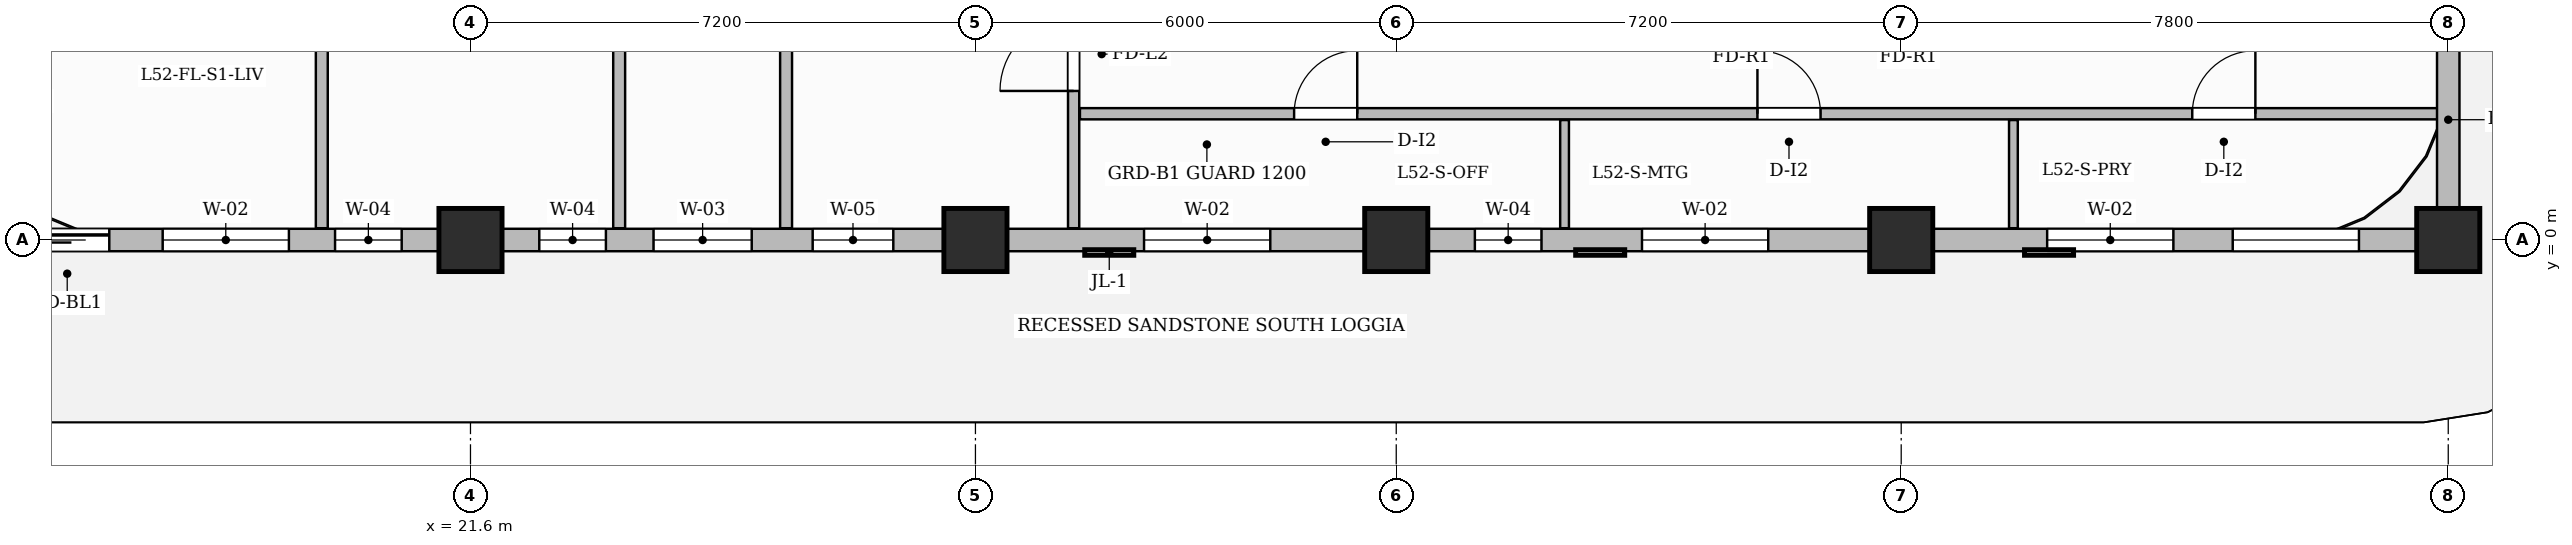
"""IFC4 building model, lengths in metres.
Left out: names, types, materials, properties, quantities, classifications, styles, units other than length and angle.
Written with IfcOpenShell. Run it as: python <this file> out.ifc"""

import sys

from ifc_helpers import new_model, si_unit, direction, frame, frame_2d, origin, origin_2d, place, context, subcontext, project, spatial, rectangle, extrude, source, transform, mapped, element, fill, save


model = new_model("IFC4")
c1 = context("Model", 3, precision=1e-05, world=origin(), true_north=direction((0.0, 1.0)))
c2 = subcontext(c1, "Body", "Model", "MODEL_VIEW")
j1 = project(units=[si_unit("LENGTHUNIT", "METRE"), si_unit("PLANEANGLEUNIT", "RADIAN")], contexts=[c1])
p1 = place(None, origin())
s1 = spatial("IfcSite", under=j1, at=p1, CompositionType="ELEMENT")
p2 = place(p1, origin())
s2 = spatial("IfcBuilding", under=s1, at=p2, CompositionType="ELEMENT")
p3 = place(p2, frame((0.0, 0.0, 209.6)))
s3 = spatial("IfcBuildingStorey", under=s2, at=p3, CompositionType="ELEMENT", Elevation=209.6)
m1 = source(origin(), c2, "Body", "SweptSolid", [
    extrude(rectangle(XDim=0.9, YDim=0.9, at=origin_2d()), origin(), (0.0, 0.0, 1.0), 3.85),
])
for number, where, z_axis, x_axis in (
    (1, (21.6, 0.0, 0.0), (0.0, 0.0, 1.0), (1.0, 0.0, 0.0)),
    (2, (28.8, 0.0, 0.0), (0.0, 0.0, 1.0), (1.0, 0.0, 0.0)),
    (3, (34.8, 0.0, 0.0), (0.0, 0.0, 1.0), (1.0, 0.0, 0.0)),
    (4, (42.0, 0.0, 0.0), (0.0, 0.0, 1.0), (1.0, 0.0, 0.0)),
    (5, (49.8, 0.0, 0.0), (0.0, 0.0, 1.0), (1.0, 0.0, 0.0)),
):
    element("IfcColumn", number, at=place(p3, frame(where, z_axis=z_axis, x_axis=x_axis)), inside=s3, PredefinedType="COLUMN", context=c2, shape_type="MappedRepresentation", body=[
        mapped(m1, transform((0.0, 0.0, 0.0), scale=1.0)),
    ])
p4 = place(p3, frame((30.2, 0.168, 0.0), z_axis=(0.0, 0.0, 1.0), x_axis=(0.0, 1.0, 0.0)))
e6 = element("IfcWall", 6, at=p4, inside=s3, PredefinedType="PARTITIONING", context=c2, shape_type="SweptSolid", body=[
    extrude(rectangle(XDim=9.692, YDim=0.16, at=frame_2d((4.846, 0.0))), origin(), (0.0, 0.0, 1.0), 3.6),
])
p5 = place(p4, frame((1.957, 0.0, 0.0)))
e7 = element("IfcOpeningElement", 7, at=p5, cuts=e6, PredefinedType="OPENING", context=c2, shape_type="SweptSolid", body=[
    extrude(rectangle(XDim=1.05, YDim=2.15, at=frame_2d((0.525, 1.075))), frame((0.0, 0.09, 0.0), z_axis=(0.0, -1.0, 0.0), x_axis=(1.0, 0.0, 0.0)), (0.0, 0.0, 1.0), 0.18),
])
p6 = place(p3, frame((30.29, 1.8, 0.0), z_axis=(0.0, 0.0, 1.0), x_axis=(1.0, 0.0, 0.0)))
e8 = element("IfcWall", 8, at=p6, inside=s3, PredefinedType="PARTITIONING", context=c2, shape_type="SweptSolid", body=[
    extrude(rectangle(XDim=19.37, YDim=0.16, at=frame_2d((9.685, 0.0))), origin(), (0.0, 0.0, 1.0), 3.6),
])
p7 = place(p6, frame((3.054, 0.0, 0.0)))
e9 = element("IfcOpeningElement", 9, at=p7, cuts=e8, PredefinedType="OPENING", context=c2, shape_type="SweptSolid", body=[
    extrude(rectangle(XDim=0.9, YDim=2.15, at=frame_2d((0.45, 1.075))), frame((0.0, 0.09, 0.0), z_axis=(0.0, -1.0, 0.0), x_axis=(1.0, 0.0, 0.0)), (0.0, 0.0, 1.0), 0.18),
])
p8 = place(p6, frame((9.66, 0.0, 0.0)))
e10 = element("IfcOpeningElement", 10, at=p8, cuts=e8, PredefinedType="OPENING", context=c2, shape_type="SweptSolid", body=[
    extrude(rectangle(XDim=0.9, YDim=2.15, at=frame_2d((0.45, 1.075))), frame((0.0, 0.09, 0.0), z_axis=(0.0, -1.0, 0.0), x_axis=(1.0, 0.0, 0.0)), (0.0, 0.0, 1.0), 0.18),
])
p9 = place(p6, frame((15.86, 0.0, 0.0)))
e11 = element("IfcOpeningElement", 11, at=p9, cuts=e8, PredefinedType="OPENING", context=c2, shape_type="SweptSolid", body=[
    extrude(rectangle(XDim=0.9, YDim=2.15, at=frame_2d((0.45, 1.075))), frame((0.0, 0.09, 0.0), z_axis=(0.0, -1.0, 0.0), x_axis=(1.0, 0.0, 0.0)), (0.0, 0.0, 1.0), 0.18),
])
for number, where, z_axis, x_axis in (
    (12, (37.2, 0.168, 0.0), (0.0, 0.0, 1.0), (0.0, 1.0, 0.0)),
    (13, (43.6, 0.168, 0.0), (0.0, 0.0, 1.0), (0.0, 1.0, 0.0)),
):
    element("IfcWall", number, at=place(p3, frame(where, z_axis=z_axis, x_axis=x_axis)), inside=s3, PredefinedType="PARTITIONING", context=c2, shape_type="SweptSolid", body=[
        extrude(rectangle(XDim=1.542, YDim=0.125, at=frame_2d((0.771, 0.0))), origin(), (0.0, 0.0, 1.0), 3.6),
    ])
p10 = place(p3, frame((19.48, 0.168, 0.0), z_axis=(0.0, 0.0, 1.0), x_axis=(0.0, 1.0, 0.0)))
e14 = element("IfcWall", 14, at=p10, inside=s3, PredefinedType="PARTITIONING", context=c2, shape_type="SweptSolid", body=[
    extrude(rectangle(XDim=9.692, YDim=0.17, at=frame_2d((4.846, 0.0))), origin(), (0.0, 0.0, 1.0), 3.6),
])
p11 = place(p10, frame((8.232, 0.0, 0.0)))
e15 = element("IfcOpeningElement", 15, at=p11, cuts=e14, PredefinedType="OPENING", context=c2, shape_type="SweptSolid", body=[
    extrude(rectangle(XDim=0.95, YDim=2.15, at=frame_2d((0.475, 1.075))), frame((0.0, 0.095, 0.0), z_axis=(0.0, -1.0, 0.0), x_axis=(1.0, 0.0, 0.0)), (0.0, 0.0, 1.0), 0.19),
])
for number, where, z_axis, x_axis in (
    (16, (23.72, 0.168, 0.0), (0.0, 0.0, 1.0), (0.0, 1.0, 0.0)),
    (17, (26.1, 0.168, 0.0), (0.0, 0.0, 1.0), (0.0, 1.0, 0.0)),
):
    element("IfcWall", number, at=place(p3, frame(where, z_axis=z_axis, x_axis=x_axis)), inside=s3, PredefinedType="PARTITIONING", context=c2, shape_type="SweptSolid", body=[
        extrude(rectangle(XDim=7.542, YDim=0.17, at=frame_2d((3.771, 0.0))), origin(), (0.0, 0.0, 1.0), 3.6),
    ])
p12 = place(p3, frame((14.4, 0.0, 0.0), z_axis=(0.0, 0.0, 1.0), x_axis=(1.0, 0.0, 0.0)))
e18 = element("IfcWall", 18, at=p12, inside=s3, PredefinedType="SOLIDWALL", context=c2, shape_type="SweptSolid", body=[
    extrude(rectangle(XDim=35.4, YDim=0.32, at=frame_2d((17.7, 0.0))), origin(), (0.0, 0.0, 1.0), 3.085),
])
p13 = place(p12, frame((0.85, 0.0, 0.0)))
e19 = element("IfcOpeningElement", 19, at=p13, cuts=e18, PredefinedType="OPENING", context=c2, shape_type="SweptSolid", body=[
    extrude(rectangle(XDim=1.2, YDim=2.2, at=frame_2d((0.6, 1.1))), frame((0.0, 0.17, 0.0), z_axis=(0.0, -1.0, 0.0), x_axis=(1.0, 0.0, 0.0)), (0.0, 0.0, 1.0), 0.34),
])
p14 = place(p12, frame((2.811, 0.0, 0.8)))
e20 = element("IfcOpeningElement", 20, at=p14, cuts=e18, PredefinedType="OPENING", context=c2, shape_type="SweptSolid", body=[
    extrude(rectangle(XDim=1.8, YDim=1.85, at=frame_2d((0.9, 0.925))), frame((0.0, 0.17, 0.0), z_axis=(0.0, -1.0, 0.0), x_axis=(1.0, 0.0, 0.0)), (0.0, 0.0, 1.0), 0.34),
])
p15 = place(p12, frame((5.269, 0.0, 0.8)))
e21 = element("IfcOpeningElement", 21, at=p15, cuts=e18, PredefinedType="OPENING", context=c2, shape_type="SweptSolid", body=[
    extrude(rectangle(XDim=0.95, YDim=1.75, at=frame_2d((0.475, 0.875))), frame((0.0, 0.17, 0.0), z_axis=(0.0, -1.0, 0.0), x_axis=(1.0, 0.0, 0.0)), (0.0, 0.0, 1.0), 0.34),
])
p16 = place(p12, frame((8.181, 0.0, 0.8)))
e22 = element("IfcOpeningElement", 22, at=p16, cuts=e18, PredefinedType="OPENING", context=c2, shape_type="SweptSolid", body=[
    extrude(rectangle(XDim=0.95, YDim=1.75, at=frame_2d((0.475, 0.875))), frame((0.0, 0.17, 0.0), z_axis=(0.0, -1.0, 0.0), x_axis=(1.0, 0.0, 0.0)), (0.0, 0.0, 1.0), 0.34),
])
p17 = place(p12, frame((9.81, 0.0, 0.8)))
e23 = element("IfcOpeningElement", 23, at=p17, cuts=e18, PredefinedType="OPENING", context=c2, shape_type="SweptSolid", body=[
    extrude(rectangle(XDim=1.4, YDim=1.85, at=frame_2d((0.7, 0.925))), frame((0.0, 0.17, 0.0), z_axis=(0.0, -1.0, 0.0), x_axis=(1.0, 0.0, 0.0)), (0.0, 0.0, 1.0), 0.34),
])
p18 = place(p12, frame((12.079, 0.0, 0.8)))
e24 = element("IfcOpeningElement", 24, at=p18, cuts=e18, PredefinedType="OPENING", context=c2, shape_type="SweptSolid", body=[
    extrude(rectangle(XDim=1.15, YDim=1.8, at=frame_2d((0.575, 0.9))), frame((0.0, 0.17, 0.0), z_axis=(0.0, -1.0, 0.0), x_axis=(1.0, 0.0, 0.0)), (0.0, 0.0, 1.0), 0.34),
])
p19 = place(p12, frame((16.804, 0.0, 0.8)))
e25 = element("IfcOpeningElement", 25, at=p19, cuts=e18, PredefinedType="OPENING", context=c2, shape_type="SweptSolid", body=[
    extrude(rectangle(XDim=1.8, YDim=1.85, at=frame_2d((0.9, 0.925))), frame((0.0, 0.17, 0.0), z_axis=(0.0, -1.0, 0.0), x_axis=(1.0, 0.0, 0.0)), (0.0, 0.0, 1.0), 0.34),
])
p20 = place(p12, frame((21.521, 0.0, 0.8)))
e26 = element("IfcOpeningElement", 26, at=p20, cuts=e18, PredefinedType="OPENING", context=c2, shape_type="SweptSolid", body=[
    extrude(rectangle(XDim=0.95, YDim=1.75, at=frame_2d((0.475, 0.875))), frame((0.0, 0.17, 0.0), z_axis=(0.0, -1.0, 0.0), x_axis=(1.0, 0.0, 0.0)), (0.0, 0.0, 1.0), 0.34),
])
p21 = place(p12, frame((23.904, 0.0, 0.8)))
e27 = element("IfcOpeningElement", 27, at=p21, cuts=e18, PredefinedType="OPENING", context=c2, shape_type="SweptSolid", body=[
    extrude(rectangle(XDim=1.8, YDim=1.85, at=frame_2d((0.9, 0.925))), frame((0.0, 0.17, 0.0), z_axis=(0.0, -1.0, 0.0), x_axis=(1.0, 0.0, 0.0)), (0.0, 0.0, 1.0), 0.34),
])
p22 = place(p12, frame((29.681, 0.0, 0.8)))
e28 = element("IfcOpeningElement", 28, at=p22, cuts=e18, PredefinedType="OPENING", context=c2, shape_type="SweptSolid", body=[
    extrude(rectangle(XDim=1.8, YDim=1.85, at=frame_2d((0.9, 0.925))), frame((0.0, 0.17, 0.0), z_axis=(0.0, -1.0, 0.0), x_axis=(1.0, 0.0, 0.0)), (0.0, 0.0, 1.0), 0.34),
])
p23 = place(p12, frame((32.327, 0.0, 0.8)))
e29 = element("IfcOpeningElement", 29, at=p23, cuts=e18, PredefinedType="OPENING", context=c2, shape_type="SweptSolid", body=[
    extrude(rectangle(XDim=1.8, YDim=1.85, at=frame_2d((0.9, 0.925))), frame((0.0, 0.17, 0.0), z_axis=(0.0, -1.0, 0.0), x_axis=(1.0, 0.0, 0.0)), (0.0, 0.0, 1.0), 0.34),
])
p24 = place(p3, frame((49.8, 0.05, 0.0), z_axis=(0.0, 0.0, 1.0), x_axis=(0.0, 1.0, 0.0)))
e30 = element("IfcWall", 30, at=p24, inside=s3, PredefinedType="SOLIDWALL", context=c2, shape_type="SweptSolid", body=[
    extrude(rectangle(XDim=3.33, YDim=0.32, at=frame_2d((1.665, 0.0))), origin(), (0.0, 0.0, 1.0), 3.6),
])
m2 = source(origin(), c2, "Body", "SweptSolid", [
    extrude(rectangle(XDim=1.05, YDim=2.15, at=frame_2d((0.525, 1.075))), frame((0.0, 0.025, 0.0), z_axis=(0.0, -1.0, 0.0), x_axis=(1.0, 0.0, 0.0)), (0.0, 0.0, 1.0), 0.05),
])
p25 = place(p5, origin())
e31 = element("IfcDoor", 31, at=p25, inside=s3, OperationType="SINGLE_SWING_LEFT", PredefinedType="DOOR", context=c2, shape_type="MappedRepresentation", body=[
    mapped(m2, transform((0.0, 0.0, 0.0), scale=1.0)),
])
fill(e7, e31)
m3 = source(origin(), c2, "Body", "SweptSolid", [
    extrude(rectangle(XDim=0.9, YDim=2.15, at=frame_2d((0.45, 1.075))), frame((0.0, 0.025, 0.0), z_axis=(0.0, -1.0, 0.0), x_axis=(1.0, 0.0, 0.0)), (0.0, 0.0, 1.0), 0.05),
])
p26 = place(p7, origin())
e32 = element("IfcDoor", 32, at=p26, inside=s3, OperationType="SINGLE_SWING_RIGHT", PredefinedType="DOOR", context=c2, shape_type="MappedRepresentation", body=[
    mapped(m3, transform((0.0, 0.0, 0.0), scale=1.0)),
])
fill(e9, e32)
p27 = place(p8, origin())
e33 = element("IfcDoor", 33, at=p27, inside=s3, OperationType="SINGLE_SWING_LEFT", PredefinedType="DOOR", context=c2, shape_type="MappedRepresentation", body=[
    mapped(m3, transform((0.0, 0.0, 0.0), scale=1.0)),
])
fill(e10, e33)
p28 = place(p9, origin())
e34 = element("IfcDoor", 34, at=p28, inside=s3, OperationType="SINGLE_SWING_RIGHT", PredefinedType="DOOR", context=c2, shape_type="MappedRepresentation", body=[
    mapped(m3, transform((0.0, 0.0, 0.0), scale=1.0)),
])
fill(e11, e34)
m4 = source(origin(), c2, "Body", "SweptSolid", [
    extrude(rectangle(XDim=1.2, YDim=2.2, at=frame_2d((0.6, 1.1))), frame((0.0, 0.025, 0.0), z_axis=(0.0, -1.0, 0.0), x_axis=(1.0, 0.0, 0.0)), (0.0, 0.0, 1.0), 0.05),
])
p29 = place(p13, origin())
e35 = element("IfcDoor", 35, at=p29, inside=s3, OperationType="SLIDING_TO_LEFT", PredefinedType="DOOR", context=c2, shape_type="MappedRepresentation", body=[
    mapped(m4, transform((0.0, 0.0, 0.0), scale=1.0)),
])
fill(e19, e35)
m5 = source(origin(), c2, "Body", "SweptSolid", [
    extrude(rectangle(XDim=1.8, YDim=1.85, at=frame_2d((0.9, 0.925))), frame((0.0, 0.03, 0.0), z_axis=(0.0, -1.0, 0.0), x_axis=(1.0, 0.0, 0.0)), (0.0, 0.0, 1.0), 0.06),
])
p30 = place(p14, origin())
e36 = element("IfcWindow", 36, at=p30, inside=s3, PartitioningType="DOUBLE_PANEL_VERTICAL", PredefinedType="WINDOW", context=c2, shape_type="MappedRepresentation", body=[
    mapped(m5, transform((0.0, 0.0, 0.0), scale=1.0)),
])
fill(e20, e36)
m6 = source(origin(), c2, "Body", "SweptSolid", [
    extrude(rectangle(XDim=0.95, YDim=1.75, at=frame_2d((0.475, 0.875))), frame((0.0, 0.03, 0.0), z_axis=(0.0, -1.0, 0.0), x_axis=(1.0, 0.0, 0.0)), (0.0, 0.0, 1.0), 0.06),
])
p31 = place(p15, origin())
e37 = element("IfcWindow", 37, at=p31, inside=s3, PartitioningType="SINGLE_PANEL", PredefinedType="WINDOW", context=c2, shape_type="MappedRepresentation", body=[
    mapped(m6, transform((0.0, 0.0, 0.0), scale=1.0)),
])
fill(e21, e37)
p32 = place(p16, origin())
e38 = element("IfcWindow", 38, at=p32, inside=s3, PartitioningType="SINGLE_PANEL", PredefinedType="WINDOW", context=c2, shape_type="MappedRepresentation", body=[
    mapped(m6, transform((0.0, 0.0, 0.0), scale=1.0)),
])
fill(e22, e38)
m7 = source(origin(), c2, "Body", "SweptSolid", [
    extrude(rectangle(XDim=1.4, YDim=1.85, at=frame_2d((0.7, 0.925))), frame((0.0, 0.03, 0.0), z_axis=(0.0, -1.0, 0.0), x_axis=(1.0, 0.0, 0.0)), (0.0, 0.0, 1.0), 0.06),
])
p33 = place(p17, origin())
e39 = element("IfcWindow", 39, at=p33, inside=s3, PartitioningType="SINGLE_PANEL", PredefinedType="WINDOW", context=c2, shape_type="MappedRepresentation", body=[
    mapped(m7, transform((0.0, 0.0, 0.0), scale=1.0)),
])
fill(e23, e39)
m8 = source(origin(), c2, "Body", "SweptSolid", [
    extrude(rectangle(XDim=1.15, YDim=1.8, at=frame_2d((0.575, 0.9))), frame((0.0, 0.03, 0.0), z_axis=(0.0, -1.0, 0.0), x_axis=(1.0, 0.0, 0.0)), (0.0, 0.0, 1.0), 0.06),
])
p34 = place(p18, origin())
e40 = element("IfcWindow", 40, at=p34, inside=s3, PartitioningType="SINGLE_PANEL", PredefinedType="WINDOW", context=c2, shape_type="MappedRepresentation", body=[
    mapped(m8, transform((0.0, 0.0, 0.0), scale=1.0)),
])
fill(e24, e40)
p35 = place(p19, origin())
e41 = element("IfcWindow", 41, at=p35, inside=s3, PartitioningType="DOUBLE_PANEL_VERTICAL", PredefinedType="WINDOW", context=c2, shape_type="MappedRepresentation", body=[
    mapped(m5, transform((0.0, 0.0, 0.0), scale=1.0)),
])
fill(e25, e41)
p36 = place(p20, origin())
e42 = element("IfcWindow", 42, at=p36, inside=s3, PartitioningType="SINGLE_PANEL", PredefinedType="WINDOW", context=c2, shape_type="MappedRepresentation", body=[
    mapped(m6, transform((0.0, 0.0, 0.0), scale=1.0)),
])
fill(e26, e42)
p37 = place(p21, origin())
e43 = element("IfcWindow", 43, at=p37, inside=s3, PartitioningType="DOUBLE_PANEL_VERTICAL", PredefinedType="WINDOW", context=c2, shape_type="MappedRepresentation", body=[
    mapped(m5, transform((0.0, 0.0, 0.0), scale=1.0)),
])
fill(e27, e43)
p38 = place(p22, origin())
e44 = element("IfcWindow", 44, at=p38, inside=s3, PartitioningType="DOUBLE_PANEL_VERTICAL", PredefinedType="WINDOW", context=c2, shape_type="MappedRepresentation", body=[
    mapped(m5, transform((0.0, 0.0, 0.0), scale=1.0)),
])
fill(e28, e44)
p39 = place(p23, origin())
e45 = element("IfcWindow", 45, at=p39, inside=s3, PartitioningType="DOUBLE_PANEL_VERTICAL", PredefinedType="WINDOW", context=c2, shape_type="MappedRepresentation", body=[
    mapped(m5, transform((0.0, 0.0, 0.0), scale=1.0)),
])
fill(e29, e45)
save(model, sys.argv[1])
